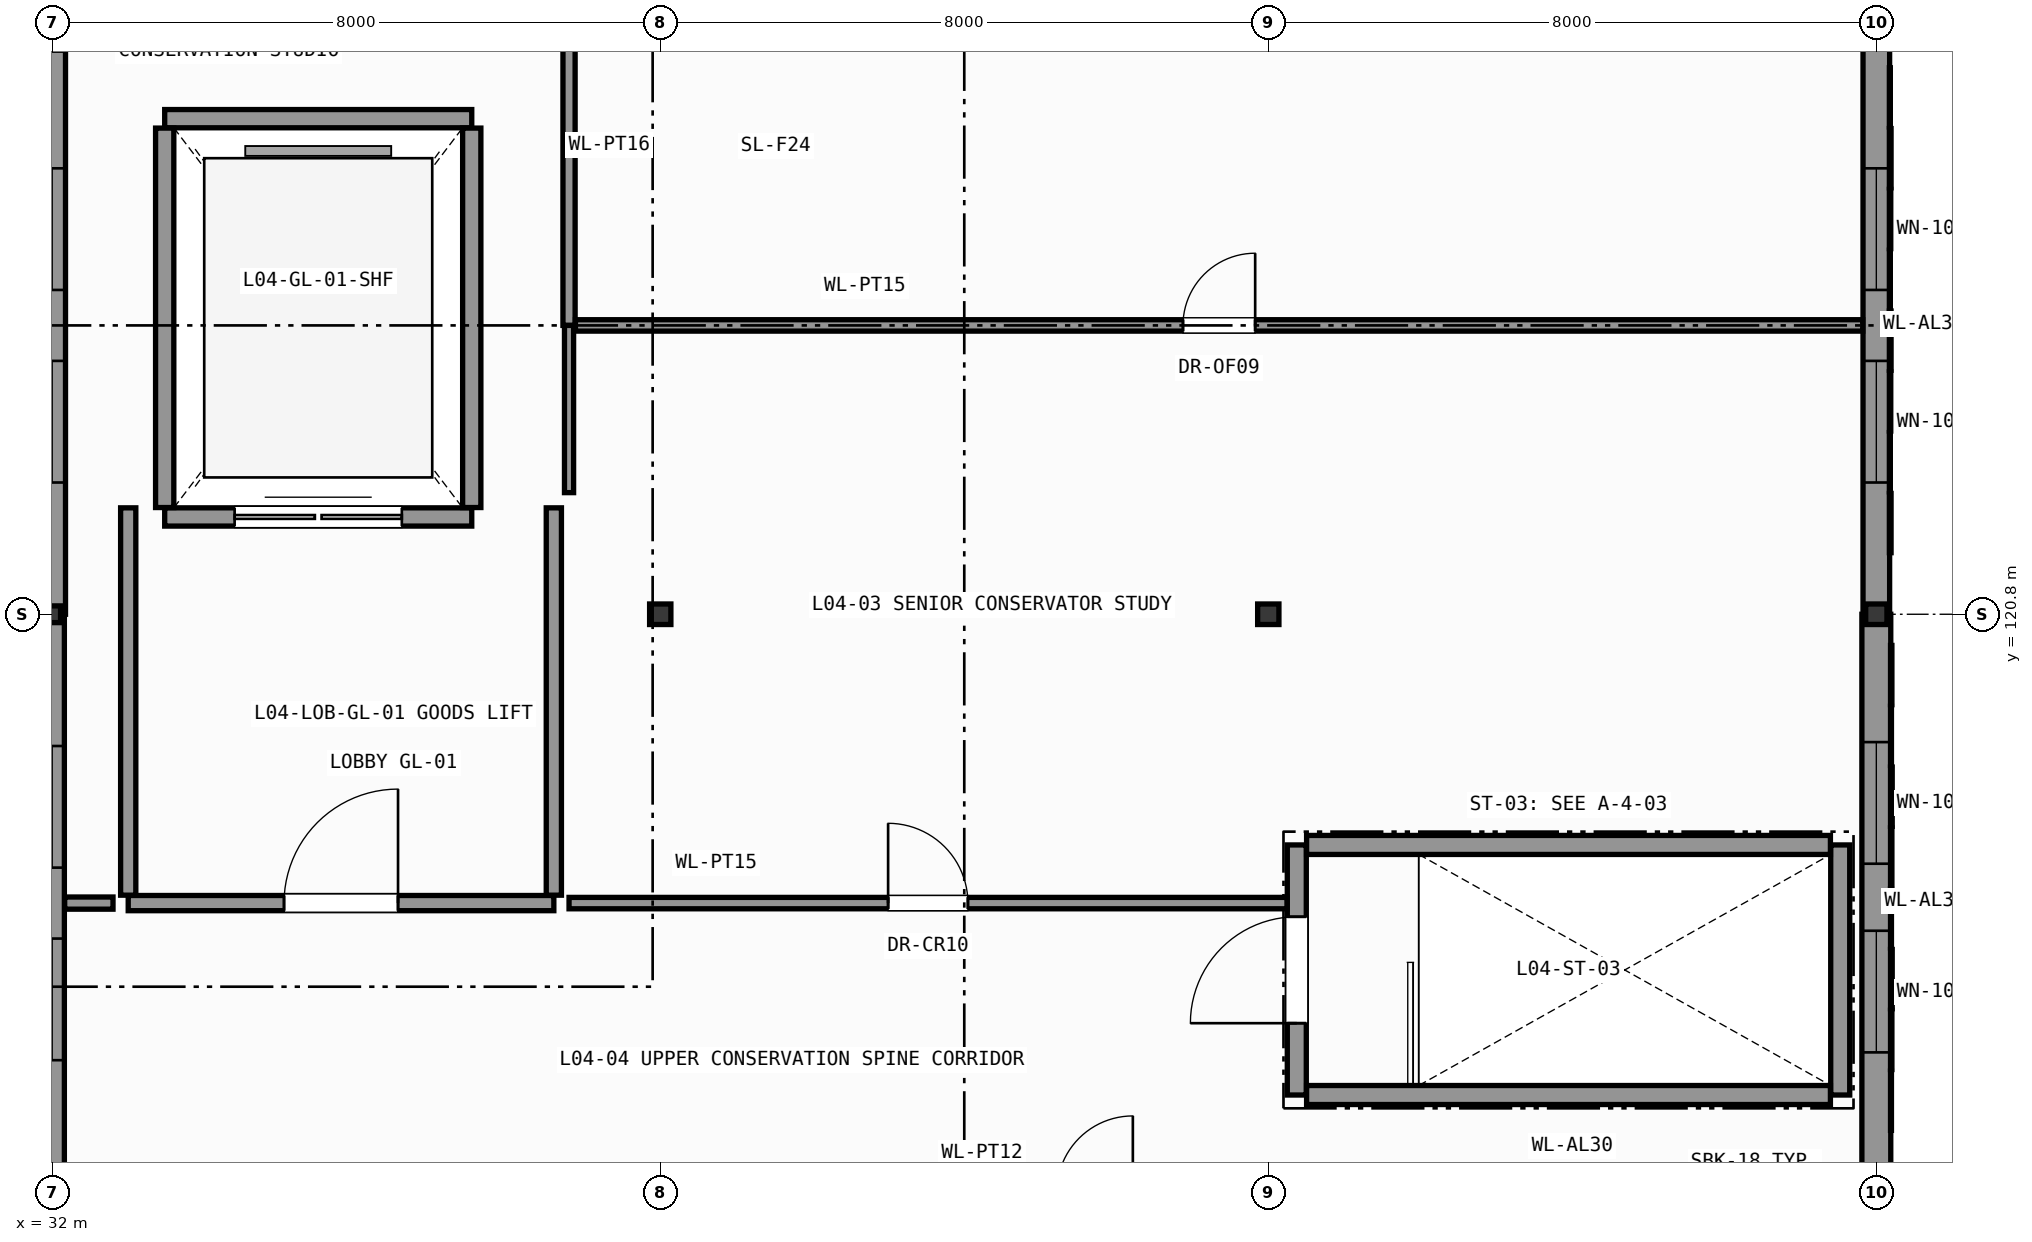
"""IFC4 building model, lengths in metres.
Left out: names, types, materials, properties, quantities, classifications, styles, units other than length and angle.
Written with IfcOpenShell. Run it as: python <this file> out.ifc"""

import sys

from ifc_helpers import new_model, si_unit, direction, frame, frame_2d, origin, origin_2d, place, context, subcontext, project, spatial, rectangle, hollow_rectangle, i_section, extrude, element, fill, save


model = new_model("IFC4")
c1 = context("Model", 3, precision=1e-05, world=origin(), true_north=direction((0.0, 1.0)))
c2 = subcontext(c1, "Body", "Model", "MODEL_VIEW")
j1 = project(units=[si_unit("LENGTHUNIT", "METRE"), si_unit("PLANEANGLEUNIT", "RADIAN")], contexts=[c1])
p1 = place(None, origin())
s1 = spatial("IfcSite", under=j1, at=p1, CompositionType="ELEMENT")
p2 = place(p1, origin())
s2 = spatial("IfcBuilding", under=s1, at=p2, CompositionType="ELEMENT")
p3 = place(p2, frame((0.0, 0.0, 18.0)))
s3 = spatial("IfcBuildingStorey", under=s2, at=p3, CompositionType="ELEMENT", Elevation=18.0)
p4 = place(p3, frame((32.0, 120.8, 0.0), z_axis=(0.0, 0.0, 1.0), x_axis=(1.0, 0.0, 0.0)))
e1 = element("IfcColumn", 1, at=p4, inside=s3, PredefinedType="COLUMN", context=c2, shape_type="SweptSolid", body=[
    extrude(hollow_rectangle(XDim=0.22, YDim=0.22, WallThickness=0.012, InnerFilletRadius=0.012, OuterFilletRadius=0.024, at=origin_2d()), origin(), (0.0, 0.0, 1.0), 4.2),
])
for number, where, z_axis, x_axis in (
    (2, (40.0, 120.8, 0.0), (0.0, 0.0, 1.0), (1.0, 0.0, 0.0)),
    (3, (48.0, 120.8, 0.0), (0.0, 0.0, 1.0), (1.0, 0.0, 0.0)),
    (4, (56.0, 120.8, 0.0), (0.0, 0.0, 1.0), (1.0, 0.0, 0.0)),
):
    element("IfcColumn", number, at=place(p3, frame(where, z_axis=z_axis, x_axis=x_axis)), inside=s3, PredefinedType="COLUMN", context=c2, shape_type="SweptSolid", body=[
        extrude(i_section(OverallWidth=0.28, OverallDepth=0.27, WebThickness=0.008, FlangeThickness=0.013, FilletRadius=0.024, at=origin_2d()), origin(), (0.0, 0.0, 1.0), 4.2),
    ])
p5 = place(p3, frame((56.0, 120.8, 0.0), z_axis=(0.0, 0.0, 1.0), x_axis=(0.0, -1.0, 0.0)))
e5 = element("IfcWall", 5, at=p5, inside=s3, PredefinedType="SOLIDWALL", context=c2, shape_type="SweptSolid", body=[
    extrude(rectangle(XDim=7.446, YDim=0.38, at=frame_2d((3.723, 0.0))), origin(), (0.0, 0.0, 1.0), 3.485),
])
p6 = place(p5, frame((1.682, 0.0, 0.95)))
e6 = element("IfcOpeningElement", 6, at=p6, cuts=e5, PredefinedType="OPENING", context=c2, shape_type="SweptSolid", body=[
    extrude(rectangle(XDim=1.6, YDim=2.13, at=frame_2d((0.8, 1.065))), frame((0.0, 0.2, 0.0), z_axis=(0.0, -1.0, 0.0), x_axis=(1.0, 0.0, 0.0)), (0.0, 0.0, 1.0), 0.4),
])
p7 = place(p5, frame((4.164, 0.0, 0.95)))
e7 = element("IfcOpeningElement", 7, at=p7, cuts=e5, PredefinedType="OPENING", context=c2, shape_type="SweptSolid", body=[
    extrude(rectangle(XDim=1.6, YDim=2.13, at=frame_2d((0.8, 1.065))), frame((0.0, 0.2, 0.0), z_axis=(0.0, -1.0, 0.0), x_axis=(1.0, 0.0, 0.0)), (0.0, 0.0, 1.0), 0.4),
])
p8 = place(p3, frame((56.0, 128.4, 0.0), z_axis=(0.0, 0.0, 1.0), x_axis=(0.0, -1.0, 0.0)))
e8 = element("IfcWall", 8, at=p8, inside=s3, PredefinedType="SOLIDWALL", context=c2, shape_type="SweptSolid", body=[
    extrude(rectangle(XDim=7.6, YDim=0.35, at=frame_2d((3.8, 0.0))), origin(), (0.0, 0.0, 1.0), 3.485),
])
p9 = place(p8, frame((1.733, 0.0, 0.95)))
e9 = element("IfcOpeningElement", 9, at=p9, cuts=e8, PredefinedType="OPENING", context=c2, shape_type="SweptSolid", body=[
    extrude(rectangle(XDim=1.6, YDim=2.13, at=frame_2d((0.8, 1.065))), frame((0.0, 0.185, 0.0), z_axis=(0.0, -1.0, 0.0), x_axis=(1.0, 0.0, 0.0)), (0.0, 0.0, 1.0), 0.37),
])
p10 = place(p8, frame((4.267, 0.0, 0.95)))
e10 = element("IfcOpeningElement", 10, at=p10, cuts=e8, PredefinedType="OPENING", context=c2, shape_type="SweptSolid", body=[
    extrude(rectangle(XDim=1.6, YDim=2.13, at=frame_2d((0.8, 1.065))), frame((0.0, 0.185, 0.0), z_axis=(0.0, -1.0, 0.0), x_axis=(1.0, 0.0, 0.0)), (0.0, 0.0, 1.0), 0.37),
])
p11 = place(p3, frame((32.0, 120.8, 0.0), z_axis=(0.0, 0.0, 1.0), x_axis=(0.0, 1.0, 0.0)))
e11 = element("IfcWall", 11, at=p11, inside=s3, PredefinedType="SOLIDWALL", context=c2, shape_type="SweptSolid", body=[
    extrude(rectangle(XDim=7.6, YDim=0.35, at=frame_2d((3.8, 0.0))), origin(), (0.0, 0.0, 1.0), 3.485),
])
p12 = place(p11, frame((1.733, 0.0, 0.95)))
e12 = element("IfcOpeningElement", 12, at=p12, cuts=e11, PredefinedType="OPENING", context=c2, shape_type="SweptSolid", body=[
    extrude(rectangle(XDim=1.6, YDim=2.13, at=frame_2d((0.8, 1.065))), frame((0.0, 0.185, 0.0), z_axis=(0.0, -1.0, 0.0), x_axis=(1.0, 0.0, 0.0)), (0.0, 0.0, 1.0), 0.37),
])
p13 = place(p11, frame((4.267, 0.0, 0.95)))
e13 = element("IfcOpeningElement", 13, at=p13, cuts=e11, PredefinedType="OPENING", context=c2, shape_type="SweptSolid", body=[
    extrude(rectangle(XDim=1.6, YDim=2.13, at=frame_2d((0.8, 1.065))), frame((0.0, 0.185, 0.0), z_axis=(0.0, -1.0, 0.0), x_axis=(1.0, 0.0, 0.0)), (0.0, 0.0, 1.0), 0.37),
])
p14 = place(p3, frame((32.0, 113.2, 0.0), z_axis=(0.0, 0.0, 1.0), x_axis=(0.0, 1.0, 0.0)))
e14 = element("IfcWall", 14, at=p14, inside=s3, PredefinedType="SOLIDWALL", context=c2, shape_type="SweptSolid", body=[
    extrude(rectangle(XDim=7.6, YDim=0.32, at=frame_2d((3.8, 0.0))), origin(), (0.0, 0.0, 1.0), 3.485),
])
p15 = place(p14, frame((1.733, 0.0, 0.95)))
e15 = element("IfcOpeningElement", 15, at=p15, cuts=e14, PredefinedType="OPENING", context=c2, shape_type="SweptSolid", body=[
    extrude(rectangle(XDim=1.6, YDim=2.13, at=frame_2d((0.8, 1.065))), frame((0.0, 0.17, 0.0), z_axis=(0.0, -1.0, 0.0), x_axis=(1.0, 0.0, 0.0)), (0.0, 0.0, 1.0), 0.34),
])
p16 = place(p14, frame((4.267, 0.0, 0.95)))
e16 = element("IfcOpeningElement", 16, at=p16, cuts=e14, PredefinedType="OPENING", context=c2, shape_type="SweptSolid", body=[
    extrude(rectangle(XDim=1.6, YDim=2.13, at=frame_2d((0.8, 1.065))), frame((0.0, 0.17, 0.0), z_axis=(0.0, -1.0, 0.0), x_axis=(1.0, 0.0, 0.0)), (0.0, 0.0, 1.0), 0.34),
])
p17 = place(p3, frame((48.375, 114.475, 0.0), z_axis=(0.0, 0.0, 1.0), x_axis=(0.0, 1.0, 0.0)))
e17 = element("IfcWall", 17, at=p17, inside=s3, PredefinedType="SHEAR", context=c2, shape_type="SweptSolid", body=[
    extrude(rectangle(XDim=3.29, YDim=0.25, at=frame_2d((1.645, 0.0))), origin(), (0.0, 0.0, 1.0), 3.98),
])
p18 = place(p17, frame((0.945, 0.0, 0.0)))
e18 = element("IfcOpeningElement", 18, at=p18, cuts=e17, PredefinedType="OPENING", context=c2, shape_type="SweptSolid", body=[
    extrude(rectangle(XDim=1.4, YDim=2.2, at=frame_2d((0.7, 1.1))), frame((0.0, 0.135, 0.0), z_axis=(0.0, -1.0, 0.0), x_axis=(1.0, 0.0, 0.0)), (0.0, 0.0, 1.0), 0.27),
])
p19 = place(p3, frame((55.525, 114.475, 0.0), z_axis=(0.0, 0.0, 1.0), x_axis=(0.0, 1.0, 0.0)))
e19 = element("IfcWall", 19, at=p19, inside=s3, PredefinedType="SHEAR", context=c2, shape_type="SweptSolid", body=[
    extrude(rectangle(XDim=3.29, YDim=0.25, at=frame_2d((1.645, 0.0))), origin(), (0.0, 0.0, 1.0), 3.98),
])
for number, where, z_axis, x_axis in (
    (20, (48.504, 114.475, 0.0), (0.0, 0.0, 1.0), (1.0, 0.0, 0.0)),
    (21, (48.504, 117.765, 0.0), (0.0, 0.0, 1.0), (1.0, 0.0, 0.0)),
):
    element("IfcWall", number, at=place(p3, frame(where, z_axis=z_axis, x_axis=x_axis)), inside=s3, PredefinedType="SHEAR", context=c2, shape_type="SweptSolid", body=[
        extrude(rectangle(XDim=6.892, YDim=0.25, at=frame_2d((3.446, 0.0))), origin(), (0.0, 0.0, 1.0), 3.98),
    ])
p20 = place(p3, frame((33.48, 122.08, 0.0), z_axis=(0.0, 0.0, 1.0), x_axis=(1.0, 0.0, 0.0)))
e22 = element("IfcWall", 22, at=p20, inside=s3, PredefinedType="SHEAR", context=c2, shape_type="SweptSolid", body=[
    extrude(rectangle(XDim=4.04, YDim=0.24, at=frame_2d((2.02, 0.0))), origin(), (0.0, 0.0, 1.0), 3.98),
])
p21 = place(p20, frame((0.92, 0.0, 0.0)))
e23 = element("IfcOpeningElement", 23, at=p21, cuts=e22, PredefinedType="OPENING", context=c2, shape_type="SweptSolid", body=[
    extrude(rectangle(XDim=2.2, YDim=2.6, at=frame_2d((1.1, 1.3))), frame((0.0, 0.13, 0.0), z_axis=(0.0, -1.0, 0.0), x_axis=(1.0, 0.0, 0.0)), (0.0, 0.0, 1.0), 0.26),
])
p22 = place(p3, frame((33.48, 127.32, 0.0), z_axis=(0.0, 0.0, 1.0), x_axis=(1.0, 0.0, 0.0)))
e24 = element("IfcWall", 24, at=p22, inside=s3, PredefinedType="SHEAR", context=c2, shape_type="SweptSolid", body=[
    extrude(rectangle(XDim=4.04, YDim=0.24, at=frame_2d((2.02, 0.0))), origin(), (0.0, 0.0, 1.0), 3.98),
])
for number, where, z_axis, x_axis in (
    (25, (33.48, 122.204, 0.0), (0.0, 0.0, 1.0), (0.0, 1.0, 0.0)),
    (26, (37.52, 122.204, 0.0), (0.0, 0.0, 1.0), (0.0, 1.0, 0.0)),
):
    element("IfcWall", number, at=place(p3, frame(where, z_axis=z_axis, x_axis=x_axis)), inside=s3, PredefinedType="SHEAR", context=c2, shape_type="SweptSolid", body=[
        extrude(rectangle(XDim=4.992, YDim=0.24, at=frame_2d((2.496, 0.0))), origin(), (0.0, 0.0, 1.0), 3.98),
    ])
p23 = place(p3, frame((33.0, 117.0, 0.0), z_axis=(0.0, 0.0, 1.0), x_axis=(1.0, 0.0, 0.0)))
e27 = element("IfcWall", 27, at=p23, inside=s3, PredefinedType="PARTITIONING", context=c2, shape_type="SweptSolid", body=[
    extrude(rectangle(XDim=5.6, YDim=0.2, at=frame_2d((2.8, 0.0))), origin(), (0.0, 0.0, 1.0), 3.98),
])
p24 = place(p23, frame((2.05, 0.0, 0.0)))
e28 = element("IfcOpeningElement", 28, at=p24, cuts=e27, PredefinedType="OPENING", context=c2, shape_type="SweptSolid", body=[
    extrude(rectangle(XDim=1.5, YDim=2.2, at=frame_2d((0.75, 1.1))), frame((0.0, 0.11, 0.0), z_axis=(0.0, -1.0, 0.0), x_axis=(1.0, 0.0, 0.0)), (0.0, 0.0, 1.0), 0.22),
])
for number, where, z_axis, x_axis in (
    (29, (33.0, 117.104, 0.0), (0.0, 0.0, 1.0), (0.0, 1.0, 0.0)),
    (30, (38.6, 117.104, 0.0), (0.0, 0.0, 1.0), (0.0, 1.0, 0.0)),
):
    element("IfcWall", number, at=place(p3, frame(where, z_axis=z_axis, x_axis=x_axis)), inside=s3, PredefinedType="PARTITIONING", context=c2, shape_type="SweptSolid", body=[
        extrude(rectangle(XDim=5.096, YDim=0.2, at=frame_2d((2.548, 0.0))), origin(), (0.0, 0.0, 1.0), 3.98),
    ])
p25 = place(p3, frame((38.8, 124.6, 0.0), z_axis=(0.0, 0.0, 1.0), x_axis=(0.0, 1.0, 0.0)))
e31 = element("IfcWall", 31, at=p25, inside=s3, PredefinedType="PARTITIONING", context=c2, shape_type="SweptSolid", body=[
    extrude(rectangle(XDim=11.221, YDim=0.16, at=frame_2d((5.61, 0.0))), origin(), (0.0, 0.0, 1.0), 3.98),
])
p26 = place(p25, frame((5.01, 0.0, 0.0)))
e32 = element("IfcOpeningElement", 32, at=p26, cuts=e31, PredefinedType="OPENING", context=c2, shape_type="SweptSolid", body=[
    extrude(rectangle(XDim=1.2, YDim=2.2, at=frame_2d((0.6, 1.1))), frame((0.0, 0.09, 0.0), z_axis=(0.0, -1.0, 0.0), x_axis=(1.0, 0.0, 0.0)), (0.0, 0.0, 1.0), 0.18),
])
p27 = place(p3, frame((38.884, 124.6, 0.0), z_axis=(0.0, 0.0, 1.0), x_axis=(1.0, 0.0, 0.0)))
e33 = element("IfcWall", 33, at=p27, inside=s3, PredefinedType="PARTITIONING", context=c2, shape_type="SweptSolid", body=[
    extrude(rectangle(XDim=16.937, YDim=0.15, at=frame_2d((8.469, 0.0))), origin(), (0.0, 0.0, 1.0), 3.98),
])
p28 = place(p27, frame((7.993, 0.0, 0.0)))
e34 = element("IfcOpeningElement", 34, at=p28, cuts=e33, PredefinedType="OPENING", context=c2, shape_type="SweptSolid", body=[
    extrude(rectangle(XDim=0.95, YDim=2.1, at=frame_2d((0.475, 1.05))), frame((0.0, 0.085, 0.0), z_axis=(0.0, -1.0, 0.0), x_axis=(1.0, 0.0, 0.0)), (0.0, 0.0, 1.0), 0.17),
])
p29 = place(p3, frame((38.8, 122.4, 0.0), z_axis=(0.0, 0.0, 1.0), x_axis=(0.0, 1.0, 0.0)))
e35 = element("IfcWall", 35, at=p29, inside=s3, PredefinedType="PARTITIONING", context=c2, shape_type="SweptSolid", body=[
    extrude(rectangle(XDim=2.2, YDim=0.12, at=frame_2d((1.1, 0.0))), origin(), (0.0, 0.0, 1.0), 3.98),
])
p30 = place(p3, frame((32.164, 117.0, 0.0), z_axis=(0.0, 0.0, 1.0), x_axis=(1.0, 0.0, 0.0)))
e36 = element("IfcWall", 36, at=p30, inside=s3, PredefinedType="PARTITIONING", context=c2, shape_type="SweptSolid", body=[
    extrude(rectangle(XDim=0.636, YDim=0.16, at=frame_2d((0.318, 0.0))), origin(), (0.0, 0.0, 1.0), 3.98),
])
p31 = place(p3, frame((38.8, 117.0, 0.0), z_axis=(0.0, 0.0, 1.0), x_axis=(1.0, 0.0, 0.0)))
e37 = element("IfcWall", 37, at=p31, inside=s3, PredefinedType="PARTITIONING", context=c2, shape_type="SweptSolid", body=[
    extrude(rectangle(XDim=9.446, YDim=0.15, at=frame_2d((4.723, 0.0))), origin(), (0.0, 0.0, 1.0), 3.98),
])
p32 = place(p31, frame((4.198, 0.0, 0.0)))
e38 = element("IfcOpeningElement", 38, at=p32, cuts=e37, PredefinedType="OPENING", context=c2, shape_type="SweptSolid", body=[
    extrude(rectangle(XDim=1.05, YDim=2.2, at=frame_2d((0.525, 1.1))), frame((0.0, 0.085, 0.0), z_axis=(0.0, -1.0, 0.0), x_axis=(1.0, 0.0, 0.0)), (0.0, 0.0, 1.0), 0.17),
])
p33 = place(p6, origin())
e39 = element("IfcWindow", 39, at=p33, inside=s3, PartitioningType="SINGLE_PANEL", PredefinedType="WINDOW", context=c2, shape_type="SweptSolid", body=[
    extrude(rectangle(XDim=1.6, YDim=2.13, at=frame_2d((0.8, 1.065))), frame((0.0, 0.03, 0.0), z_axis=(0.0, -1.0, 0.0), x_axis=(1.0, 0.0, 0.0)), (0.0, 0.0, 1.0), 0.06),
])
fill(e6, e39)
p34 = place(p7, origin())
e40 = element("IfcWindow", 40, at=p34, inside=s3, PartitioningType="SINGLE_PANEL", PredefinedType="WINDOW", context=c2, shape_type="SweptSolid", body=[
    extrude(rectangle(XDim=1.6, YDim=2.13, at=frame_2d((0.8, 1.065))), frame((0.0, 0.03, 0.0), z_axis=(0.0, -1.0, 0.0), x_axis=(1.0, 0.0, 0.0)), (0.0, 0.0, 1.0), 0.06),
])
fill(e7, e40)
p35 = place(p9, origin())
e41 = element("IfcWindow", 41, at=p35, inside=s3, PartitioningType="SINGLE_PANEL", PredefinedType="WINDOW", context=c2, shape_type="SweptSolid", body=[
    extrude(rectangle(XDim=1.6, YDim=2.13, at=frame_2d((0.8, 1.065))), frame((0.0, 0.03, 0.0), z_axis=(0.0, -1.0, 0.0), x_axis=(1.0, 0.0, 0.0)), (0.0, 0.0, 1.0), 0.06),
])
fill(e9, e41)
p36 = place(p10, origin())
e42 = element("IfcWindow", 42, at=p36, inside=s3, PartitioningType="SINGLE_PANEL", PredefinedType="WINDOW", context=c2, shape_type="SweptSolid", body=[
    extrude(rectangle(XDim=1.6, YDim=2.13, at=frame_2d((0.8, 1.065))), frame((0.0, 0.03, 0.0), z_axis=(0.0, -1.0, 0.0), x_axis=(1.0, 0.0, 0.0)), (0.0, 0.0, 1.0), 0.06),
])
fill(e10, e42)
p37 = place(p12, origin())
e43 = element("IfcWindow", 43, at=p37, inside=s3, PartitioningType="SINGLE_PANEL", PredefinedType="WINDOW", context=c2, shape_type="SweptSolid", body=[
    extrude(rectangle(XDim=1.6, YDim=2.13, at=frame_2d((0.8, 1.065))), frame((0.0, 0.03, 0.0), z_axis=(0.0, -1.0, 0.0), x_axis=(1.0, 0.0, 0.0)), (0.0, 0.0, 1.0), 0.06),
])
fill(e12, e43)
p38 = place(p13, origin())
e44 = element("IfcWindow", 44, at=p38, inside=s3, PartitioningType="SINGLE_PANEL", PredefinedType="WINDOW", context=c2, shape_type="SweptSolid", body=[
    extrude(rectangle(XDim=1.6, YDim=2.13, at=frame_2d((0.8, 1.065))), frame((0.0, 0.03, 0.0), z_axis=(0.0, -1.0, 0.0), x_axis=(1.0, 0.0, 0.0)), (0.0, 0.0, 1.0), 0.06),
])
fill(e13, e44)
p39 = place(p15, origin())
e45 = element("IfcWindow", 45, at=p39, inside=s3, PartitioningType="SINGLE_PANEL", PredefinedType="WINDOW", context=c2, shape_type="SweptSolid", body=[
    extrude(rectangle(XDim=1.6, YDim=2.13, at=frame_2d((0.8, 1.065))), frame((0.0, 0.03, 0.0), z_axis=(0.0, -1.0, 0.0), x_axis=(1.0, 0.0, 0.0)), (0.0, 0.0, 1.0), 0.06),
])
fill(e15, e45)
p40 = place(p16, origin())
e46 = element("IfcWindow", 46, at=p40, inside=s3, PartitioningType="SINGLE_PANEL", PredefinedType="WINDOW", context=c2, shape_type="SweptSolid", body=[
    extrude(rectangle(XDim=1.6, YDim=2.13, at=frame_2d((0.8, 1.065))), frame((0.0, 0.03, 0.0), z_axis=(0.0, -1.0, 0.0), x_axis=(1.0, 0.0, 0.0)), (0.0, 0.0, 1.0), 0.06),
])
fill(e16, e46)
p41 = place(p18, origin())
e47 = element("IfcDoor", 47, at=p41, inside=s3, OperationType="SINGLE_SWING_LEFT", PredefinedType="DOOR", context=c2, shape_type="SweptSolid", body=[
    extrude(rectangle(XDim=1.4, YDim=2.2, at=frame_2d((0.7, 1.1))), frame((0.0, 0.025, 0.0), z_axis=(0.0, -1.0, 0.0), x_axis=(1.0, 0.0, 0.0)), (0.0, 0.0, 1.0), 0.05),
])
fill(e18, e47)
p42 = place(p21, origin())
e48 = element("IfcDoor", 48, at=p42, inside=s3, OperationType="DOUBLE_DOOR_SLIDING", PredefinedType="DOOR", context=c2, shape_type="SweptSolid", body=[
    extrude(rectangle(XDim=2.2, YDim=2.6, at=frame_2d((1.1, 1.3))), frame((0.0, 0.025, 0.0), z_axis=(0.0, -1.0, 0.0), x_axis=(1.0, 0.0, 0.0)), (0.0, 0.0, 1.0), 0.05),
])
fill(e23, e48)
p43 = place(p24, origin())
e49 = element("IfcDoor", 49, at=p43, inside=s3, OperationType="SINGLE_SWING_RIGHT", PredefinedType="DOOR", context=c2, shape_type="SweptSolid", body=[
    extrude(rectangle(XDim=1.5, YDim=2.2, at=frame_2d((0.75, 1.1))), frame((0.0, 0.025, 0.0), z_axis=(0.0, -1.0, 0.0), x_axis=(1.0, 0.0, 0.0)), (0.0, 0.0, 1.0), 0.05),
])
fill(e28, e49)
p44 = place(p28, origin())
e50 = element("IfcDoor", 50, at=p44, inside=s3, OperationType="SINGLE_SWING_RIGHT", PredefinedType="DOOR", context=c2, shape_type="SweptSolid", body=[
    extrude(rectangle(XDim=0.95, YDim=2.1, at=frame_2d((0.475, 1.05))), frame((0.0, 0.025, 0.0), z_axis=(0.0, -1.0, 0.0), x_axis=(1.0, 0.0, 0.0)), (0.0, 0.0, 1.0), 0.05),
])
fill(e34, e50)
p45 = place(p32, origin())
e51 = element("IfcDoor", 51, at=p45, inside=s3, OperationType="SINGLE_SWING_LEFT", PredefinedType="DOOR", context=c2, shape_type="SweptSolid", body=[
    extrude(rectangle(XDim=1.05, YDim=2.2, at=frame_2d((0.525, 1.1))), frame((0.0, 0.025, 0.0), z_axis=(0.0, -1.0, 0.0), x_axis=(1.0, 0.0, 0.0)), (0.0, 0.0, 1.0), 0.05),
])
fill(e38, e51)
save(model, sys.argv[1])
